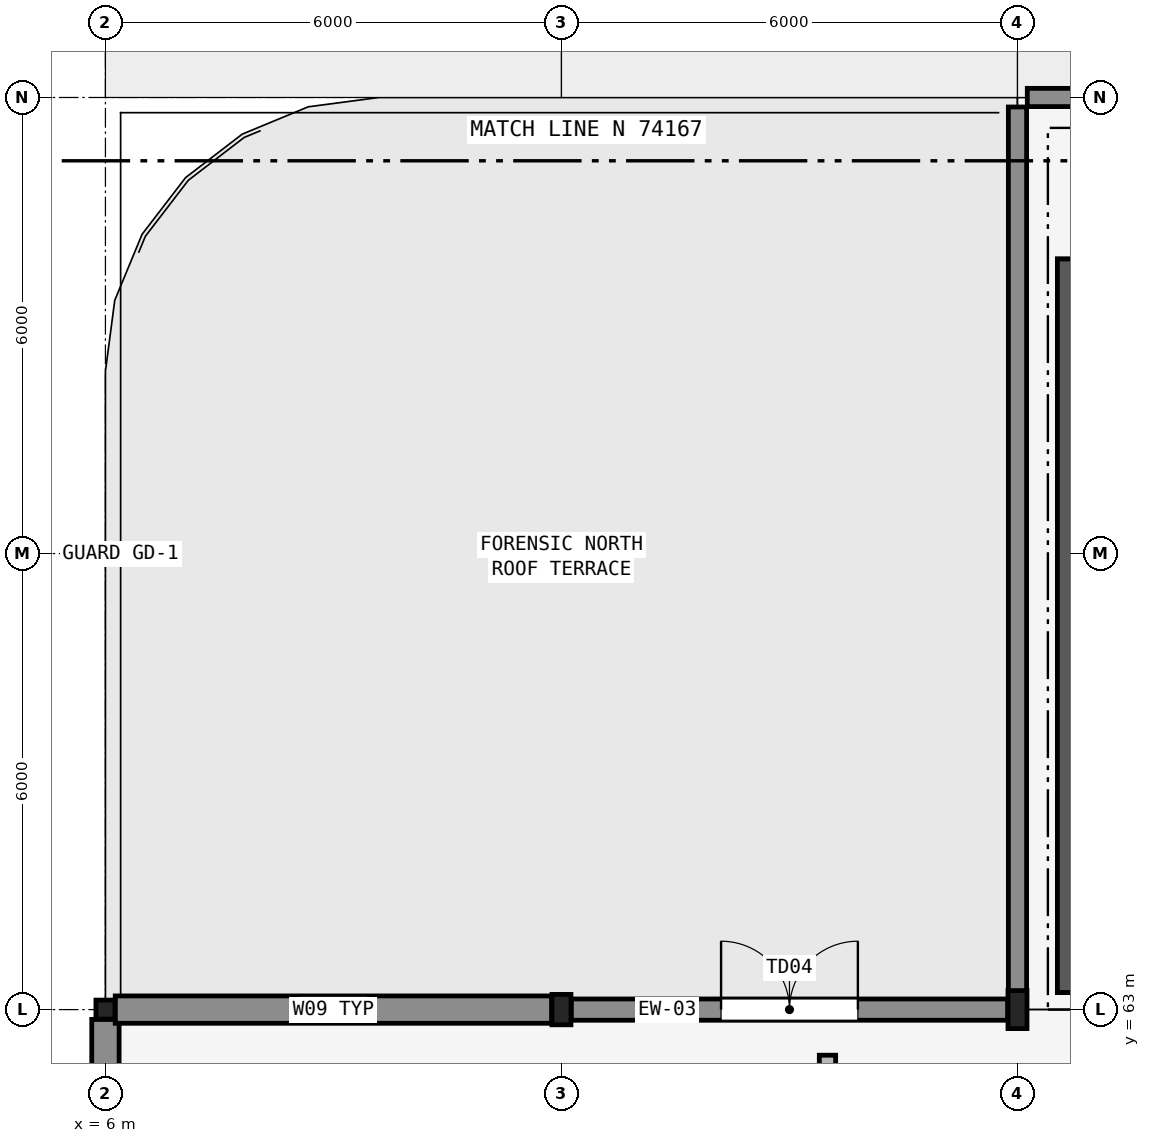
"""IFC4 building model, lengths in metres.
Left out: names, types, materials, properties, quantities, classifications, styles, units other than length and angle.
Written with IfcOpenShell. Run it as: python <this file> out.ifc"""

import sys

from ifc_helpers import new_model, si_unit, direction, frame, frame_2d, origin, origin_2d, place, context, subcontext, project, spatial, rectangle, hollow_rectangle, i_section, extrude, element, fill, save


model = new_model("IFC4")
c1 = context("Model", 3, precision=1e-05, world=origin(), true_north=direction((0.0, 1.0)))
c2 = subcontext(c1, "Body", "Model", "MODEL_VIEW")
j1 = project(units=[si_unit("LENGTHUNIT", "METRE"), si_unit("PLANEANGLEUNIT", "RADIAN")], contexts=[c1])
p1 = place(None, origin())
s1 = spatial("IfcSite", under=j1, at=p1, CompositionType="ELEMENT")
p2 = place(p1, origin())
s2 = spatial("IfcBuilding", under=s1, at=p2, CompositionType="ELEMENT")
p3 = place(p2, frame((0.0, 0.0, 18.0)))
s3 = spatial("IfcBuildingStorey", under=s2, at=p3, CompositionType="ELEMENT", Elevation=18.0)
p4 = place(p3, frame((6.0, 63.0, 0.0), z_axis=(0.0, 0.0, 1.0), x_axis=(1.0, 0.0, 0.0)))
e1 = element("IfcColumn", 1, at=p4, inside=s3, PredefinedType="COLUMN", context=c2, shape_type="SweptSolid", body=[
    extrude(hollow_rectangle(XDim=0.25, YDim=0.25, WallThickness=0.012, InnerFilletRadius=0.012, OuterFilletRadius=0.024, at=origin_2d()), origin(), (0.0, 0.0, 1.0), 4.2),
])
p5 = place(p3, frame((12.0, 63.0, 0.0), z_axis=(0.0, 0.0, 1.0), x_axis=(1.0, 0.0, 0.0)))
e2 = element("IfcColumn", 2, at=p5, inside=s3, PredefinedType="COLUMN", context=c2, shape_type="SweptSolid", body=[
    extrude(i_section(OverallWidth=0.25, OverallDepth=0.4, WebThickness=0.01, FlangeThickness=0.013, FilletRadius=0.014, at=origin_2d()), origin(), (0.0, 0.0, 1.0), 4.2),
])
p6 = place(p3, frame((18.0, 63.0, 0.0), z_axis=(0.0, 0.0, 1.0), x_axis=(1.0, 0.0, 0.0)))
e3 = element("IfcColumn", 3, at=p6, inside=s3, PredefinedType="COLUMN", context=c2, shape_type="SweptSolid", body=[
    extrude(i_section(OverallWidth=0.25, OverallDepth=0.5, WebThickness=0.01, FlangeThickness=0.015, FilletRadius=0.015, at=origin_2d()), origin(), (0.0, 0.0, 1.0), 4.2),
])
p7 = place(p3, frame((6.0, 57.254, 0.0), z_axis=(0.0, 0.0, 1.0), x_axis=(0.0, 1.0, 0.0)))
e4 = element("IfcWall", 4, at=p7, inside=s3, PredefinedType="SOLIDWALL", context=c2, shape_type="SweptSolid", body=[
    extrude(rectangle(XDim=5.617, YDim=0.36, at=frame_2d((2.809, 0.0))), origin(), (0.0, 0.0, 1.0), 3.29),
])
p8 = place(p7, frame((1.608, 0.0, 1.1)))
e5 = element("IfcOpeningElement", 5, at=p8, cuts=e4, PredefinedType="OPENING", context=c2, shape_type="SweptSolid", body=[
    extrude(rectangle(XDim=2.4, YDim=1.2, at=frame_2d((1.2, 0.6))), frame((0.0, 0.19, 0.0), z_axis=(0.0, -1.0, 0.0), x_axis=(1.0, 0.0, 0.0)), (0.0, 0.0, 1.0), 0.38),
])
p9 = place(p3, frame((6.129, 63.0, 0.0), z_axis=(0.0, 0.0, 1.0), x_axis=(1.0, 0.0, 0.0)))
e6 = element("IfcWall", 6, at=p9, inside=s3, PredefinedType="SOLIDWALL", context=c2, shape_type="SweptSolid", body=[
    extrude(rectangle(XDim=5.742, YDim=0.36, at=frame_2d((2.871, 0.0))), origin(), (0.0, 0.0, 1.0), 3.29),
])
p10 = place(p9, frame((2.421, 0.0, 1.0)))
e7 = element("IfcOpeningElement", 7, at=p10, cuts=e6, PredefinedType="OPENING", context=c2, shape_type="SweptSolid", body=[
    extrude(rectangle(XDim=0.9, YDim=1.5, at=frame_2d((0.45, 0.75))), frame((0.0, 0.19, 0.0), z_axis=(0.0, -1.0, 0.0), x_axis=(1.0, 0.0, 0.0)), (0.0, 0.0, 1.0), 0.38),
])
p11 = place(p3, frame((12.129, 63.0, 0.0), z_axis=(0.0, 0.0, 1.0), x_axis=(1.0, 0.0, 0.0)))
e8 = element("IfcWall", 8, at=p11, inside=s3, PredefinedType="SOLIDWALL", context=c2, shape_type="SweptSolid", body=[
    extrude(rectangle(XDim=5.742, YDim=0.28, at=frame_2d((2.871, 0.0))), origin(), (0.0, 0.0, 1.0), 3.29),
])
p12 = place(p11, frame((1.971, 0.0, 0.0)))
e9 = element("IfcOpeningElement", 9, at=p12, cuts=e8, PredefinedType="OPENING", context=c2, shape_type="SweptSolid", body=[
    extrude(rectangle(XDim=1.8, YDim=2.3, at=frame_2d((0.9, 1.15))), frame((0.0, 0.15, 0.0), z_axis=(0.0, -1.0, 0.0), x_axis=(1.0, 0.0, 0.0)), (0.0, 0.0, 1.0), 0.3),
])
p13 = place(p3, frame((18.129, 75.0, 0.0), z_axis=(0.0, 0.0, 1.0), x_axis=(1.0, 0.0, 0.0)))
e10 = element("IfcWall", 10, at=p13, inside=s3, PredefinedType="SOLIDWALL", context=c2, shape_type="SweptSolid", body=[
    extrude(rectangle(XDim=16.746, YDim=0.24, at=frame_2d((8.373, 0.0))), origin(), (0.0, 0.0, 1.0), 3.895),
])
p14 = place(p3, frame((18.0, 63.129, 0.0), z_axis=(0.0, 0.0, 1.0), x_axis=(0.0, 1.0, 0.0)))
e11 = element("IfcWall", 11, at=p14, inside=s3, PredefinedType="SOLIDWALL", context=c2, shape_type="SweptSolid", body=[
    extrude(rectangle(XDim=11.746, YDim=0.24, at=frame_2d((5.873, 0.0))), origin(), (0.0, 0.0, 1.0), 3.29),
])
for number, where, z_axis, x_axis in (
    (12, (18.525, 63.4, 0.0), (0.0, 0.0, 1.0), (1.0, 0.0, 0.0)),
    (13, (23.375, 72.7, 0.0), (0.0, 0.0, 1.0), (-1.0, 0.0, 0.0)),
):
    element("IfcWall", number, at=place(p3, frame(where, z_axis=z_axis, x_axis=x_axis)), inside=s3, PredefinedType="SHEAR", context=c2, shape_type="SweptSolid", body=[
        extrude(rectangle(XDim=4.85, YDim=0.35, at=frame_2d((2.425, 0.0))), origin(), (0.0, 0.0, 1.0), 4.06),
    ])
p15 = place(p3, frame((18.7, 72.875, 0.0), z_axis=(0.0, 0.0, 1.0), x_axis=(0.0, -1.0, 0.0)))
e14 = element("IfcWall", 14, at=p15, inside=s3, PredefinedType="SHEAR", context=c2, shape_type="SweptSolid", body=[
    extrude(rectangle(XDim=9.65, YDim=0.35, at=frame_2d((4.825, 0.0))), origin(), (0.0, 0.0, 1.0), 4.06),
])
p16 = place(p3, frame((15.5, 62.4, 0.0), z_axis=(0.0, 0.0, 1.0), x_axis=(0.0, -1.0, 0.0)))
e15 = element("IfcWall", 15, at=p16, inside=s3, PredefinedType="PARTITIONING", context=c2, shape_type="SweptSolid", body=[
    extrude(rectangle(XDim=15.0, YDim=0.215, at=frame_2d((7.5, 0.0))), origin(), (0.0, 0.0, 1.0), 3.39),
])
p17 = place(p16, frame((6.9, 0.0, 0.0)))
e16 = element("IfcOpeningElement", 16, at=p17, cuts=e15, PredefinedType="OPENING", context=c2, shape_type="SweptSolid", body=[
    extrude(rectangle(XDim=1.2, YDim=2.15, at=frame_2d((0.6, 1.075))), frame((0.0, 0.117, 0.0), z_axis=(0.0, -1.0, 0.0), x_axis=(1.0, 0.0, 0.0)), (0.0, 0.0, 1.0), 0.235),
])
p18 = place(p10, origin())
e17 = element("IfcWindow", 17, at=p18, inside=s3, PartitioningType="SINGLE_PANEL", PredefinedType="WINDOW", context=c2, shape_type="SweptSolid", body=[
    extrude(rectangle(XDim=0.9, YDim=1.5, at=frame_2d((0.45, 0.75))), frame((0.0, 0.03, 0.0), z_axis=(0.0, -1.0, 0.0), x_axis=(1.0, 0.0, 0.0)), (0.0, 0.0, 1.0), 0.06),
])
fill(e7, e17)
p19 = place(p12, origin())
e18 = element("IfcDoor", 18, at=p19, inside=s3, OperationType="DOUBLE_DOOR_SINGLE_SWING", PredefinedType="DOOR", context=c2, shape_type="SweptSolid", body=[
    extrude(rectangle(XDim=1.8, YDim=2.3, at=frame_2d((0.9, 1.15))), frame((0.0, 0.025, 0.0), z_axis=(0.0, -1.0, 0.0), x_axis=(1.0, 0.0, 0.0)), (0.0, 0.0, 1.0), 0.05),
])
fill(e9, e18)
save(model, sys.argv[1])
